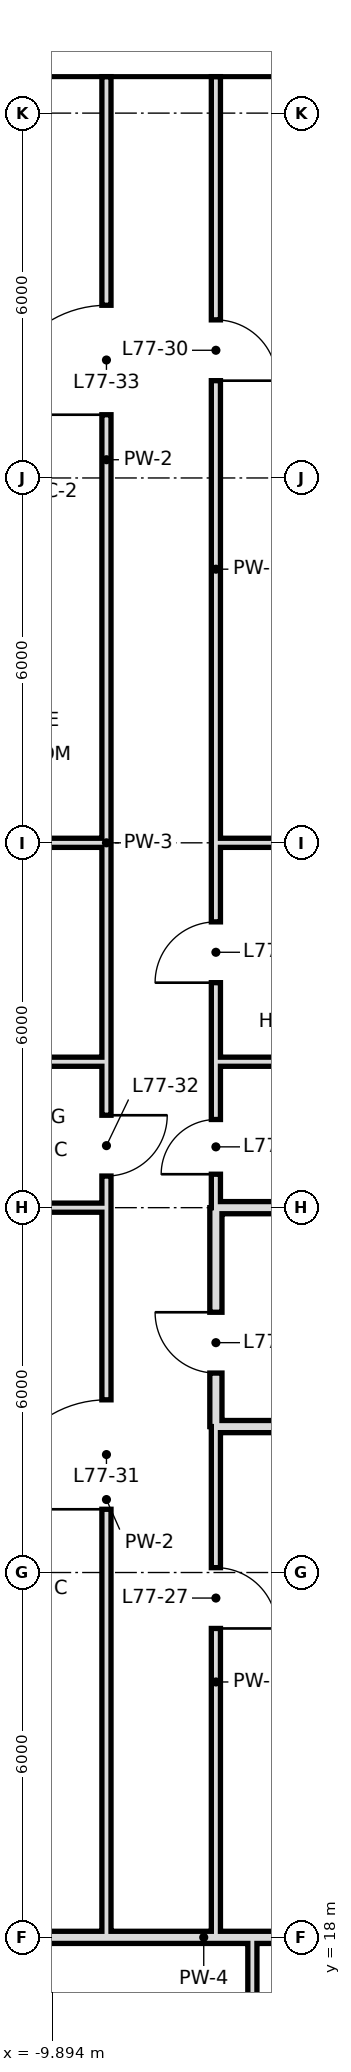
"""IFC4 building model, lengths in metres.
Left out: names, types, materials, properties, quantities, classifications, styles, units other than length and angle.
Written with IfcOpenShell. Run it as: python <this file> out.ifc"""

import sys

from ifc_helpers import new_model, si_unit, direction, frame, frame_2d, origin, place, context, subcontext, project, spatial, rectangle, extrude, element, fill, save


model = new_model("IFC4")
c1 = context("Model", 3, precision=1e-05, world=origin(), true_north=direction((0.0, 1.0)))
c2 = subcontext(c1, "Body", "Model", "MODEL_VIEW")
j1 = project(units=[si_unit("LENGTHUNIT", "METRE"), si_unit("PLANEANGLEUNIT", "RADIAN")], contexts=[c1])
p1 = place(None, origin())
s1 = spatial("IfcSite", under=j1, at=p1, CompositionType="ELEMENT")
p2 = place(p1, origin())
s2 = spatial("IfcBuilding", under=s1, at=p2, CompositionType="ELEMENT")
p3 = place(p2, frame((0.0, 0.0, 323.2)))
s3 = spatial("IfcBuildingStorey", under=s2, at=p3, CompositionType="ELEMENT", Elevation=323.2)
p4 = place(p3, frame((-6.6, 10.8, 0.0), z_axis=(0.0, 0.0, 1.0), x_axis=(0.0, 1.0, 0.0)))
e1 = element("IfcWall", 1, at=p4, inside=s3, PredefinedType="PARTITIONING", context=c2, shape_type="SweptSolid", body=[
    extrude(rectangle(XDim=7.2, YDim=0.15, at=frame_2d((3.6, 0.0))), origin(), (0.0, 0.0, 1.0), 3.42),
])
p5 = place(p3, frame((-7.2, 26.4, 0.0), z_axis=(0.0, 0.0, 1.0), x_axis=(0.0, 1.0, 0.0)))
e2 = element("IfcWall", 2, at=p5, inside=s3, PredefinedType="SOLIDWALL", context=c2, shape_type="SweptSolid", body=[
    extrude(rectangle(XDim=3.6, YDim=0.2, at=frame_2d((1.8, 0.0))), origin(), (0.0, 0.0, 1.0), 2.72),
])
p6 = place(p5, frame((0.88, 0.0, 0.0)))
e3 = element("IfcOpeningElement", 3, at=p6, cuts=e2, PredefinedType="OPENING", context=c2, shape_type="SweptSolid", body=[
    extrude(rectangle(XDim=1.0, YDim=2.4, at=frame_2d((0.5, 1.2))), frame((0.0, 0.11, 0.0), z_axis=(0.0, -1.0, 0.0), x_axis=(1.0, 0.0, 0.0)), (0.0, 0.0, 1.0), 0.22),
])
p7 = place(p3, frame((-7.2, 18.0, 0.0), z_axis=(0.0, 0.0, 1.0), x_axis=(0.0, 1.0, 0.0)))
e4 = element("IfcWall", 4, at=p7, inside=s3, PredefinedType="PARTITIONING", context=c2, shape_type="SweptSolid", body=[
    extrude(rectangle(XDim=8.4, YDim=0.15, at=frame_2d((4.2, 0.0))), origin(), (0.0, 0.0, 1.0), 3.42),
])
p8 = place(p7, frame((5.08, 0.0, 0.0)))
e5 = element("IfcOpeningElement", 5, at=p8, cuts=e4, PredefinedType="OPENING", context=c2, shape_type="SweptSolid", body=[
    extrude(rectangle(XDim=1.0, YDim=2.4, at=frame_2d((0.5, 1.2))), frame((0.0, 0.085, 0.0), z_axis=(0.0, -1.0, 0.0), x_axis=(1.0, 0.0, 0.0)), (0.0, 0.0, 1.0), 0.17),
])
p9 = place(p3, frame((-7.2, 32.4, 0.0), z_axis=(0.0, 0.0, 1.0), x_axis=(0.0, 1.0, 0.0)))
e6 = element("IfcWall", 6, at=p9, inside=s3, PredefinedType="PARTITIONING", context=c2, shape_type="SweptSolid", body=[
    extrude(rectangle(XDim=16.2, YDim=0.15, at=frame_2d((8.1, 0.0))), origin(), (0.0, 0.0, 1.0), 3.42),
])
p10 = place(p9, frame((1.3, 0.0, 0.0)))
e7 = element("IfcOpeningElement", 7, at=p10, cuts=e6, PredefinedType="OPENING", context=c2, shape_type="SweptSolid", body=[
    extrude(rectangle(XDim=1.0, YDim=2.4, at=frame_2d((0.5, 1.2))), frame((0.0, 0.085, 0.0), z_axis=(0.0, -1.0, 0.0), x_axis=(1.0, 0.0, 0.0)), (0.0, 0.0, 1.0), 0.17),
])
p11 = place(p9, frame((11.2, 0.0, 0.0)))
e8 = element("IfcOpeningElement", 8, at=p11, cuts=e6, PredefinedType="OPENING", context=c2, shape_type="SweptSolid", body=[
    extrude(rectangle(XDim=1.0, YDim=2.4, at=frame_2d((0.5, 1.2))), frame((0.0, 0.085, 0.0), z_axis=(0.0, -1.0, 0.0), x_axis=(1.0, 0.0, 0.0)), (0.0, 0.0, 1.0), 0.17),
])
p12 = place(p3, frame((-7.2, 30.0, 0.0), z_axis=(0.0, 0.0, 1.0), x_axis=(0.0, 1.0, 0.0)))
e9 = element("IfcWall", 9, at=p12, inside=s3, PredefinedType="PARTITIONING", context=c2, shape_type="SweptSolid", body=[
    extrude(rectangle(XDim=2.4, YDim=0.15, at=frame_2d((1.2, 0.0))), origin(), (0.0, 0.0, 1.0), 3.42),
])
p13 = place(p12, frame((0.55, 0.0, 0.0)))
e10 = element("IfcOpeningElement", 10, at=p13, cuts=e9, PredefinedType="OPENING", context=c2, shape_type="SweptSolid", body=[
    extrude(rectangle(XDim=0.9, YDim=2.4, at=frame_2d((0.45, 1.2))), frame((0.0, 0.085, 0.0), z_axis=(0.0, -1.0, 0.0), x_axis=(1.0, 0.0, 0.0)), (0.0, 0.0, 1.0), 0.17),
])
p14 = place(p3, frame((-9.0, 18.0, 0.0), z_axis=(0.0, 0.0, 1.0), x_axis=(0.0, 1.0, 0.0)))
e11 = element("IfcWall", 11, at=p14, inside=s3, PredefinedType="PARTITIONING", context=c2, shape_type="SweptSolid", body=[
    extrude(rectangle(XDim=14.4, YDim=0.15, at=frame_2d((7.2, 0.0))), origin(), (0.0, 0.0, 1.0), 3.42),
])
p15 = place(p14, frame((7.04, 0.0, 0.0)))
e12 = element("IfcOpeningElement", 12, at=p15, cuts=e11, PredefinedType="OPENING", context=c2, shape_type="SweptSolid", body=[
    extrude(rectangle(XDim=1.8, YDim=2.4, at=frame_2d((0.9, 1.2))), frame((0.0, 0.085, 0.0), z_axis=(0.0, -1.0, 0.0), x_axis=(1.0, 0.0, 0.0)), (0.0, 0.0, 1.0), 0.17),
])
p16 = place(p14, frame((12.52, 0.0, 0.0)))
e13 = element("IfcOpeningElement", 13, at=p16, cuts=e11, PredefinedType="OPENING", context=c2, shape_type="SweptSolid", body=[
    extrude(rectangle(XDim=1.0, YDim=2.4, at=frame_2d((0.5, 1.2))), frame((0.0, 0.085, 0.0), z_axis=(0.0, -1.0, 0.0), x_axis=(1.0, 0.0, 0.0)), (0.0, 0.0, 1.0), 0.17),
])
p17 = place(p3, frame((-9.0, 36.0, 0.0), z_axis=(0.0, 0.0, 1.0), x_axis=(0.0, 1.0, 0.0)))
e14 = element("IfcWall", 14, at=p17, inside=s3, PredefinedType="PARTITIONING", context=c2, shape_type="SweptSolid", body=[
    extrude(rectangle(XDim=12.6, YDim=0.15, at=frame_2d((6.3, 0.0))), origin(), (0.0, 0.0, 1.0), 3.42),
])
p18 = place(p17, frame((7.04, 0.0, 0.0)))
e15 = element("IfcOpeningElement", 15, at=p18, cuts=e14, PredefinedType="OPENING", context=c2, shape_type="SweptSolid", body=[
    extrude(rectangle(XDim=1.8, YDim=2.4, at=frame_2d((0.9, 1.2))), frame((0.0, 0.085, 0.0), z_axis=(0.0, -1.0, 0.0), x_axis=(1.0, 0.0, 0.0)), (0.0, 0.0, 1.0), 0.17),
])
p19 = place(p3, frame((-9.0, 32.4, 0.0), z_axis=(0.0, 0.0, 1.0), x_axis=(0.0, 1.0, 0.0)))
e16 = element("IfcWall", 16, at=p19, inside=s3, PredefinedType="PARTITIONING", context=c2, shape_type="SweptSolid", body=[
    extrude(rectangle(XDim=3.6, YDim=0.15, at=frame_2d((1.8, 0.0))), origin(), (0.0, 0.0, 1.0), 3.42),
])
p20 = place(p3, frame((-18.6, 18.0, 0.0), z_axis=(0.0, 0.0, 1.0), x_axis=(1.0, 0.0, 0.0)))
e17 = element("IfcWall", 17, at=p20, inside=s3, PredefinedType="SOLIDWALL", context=c2, shape_type="SweptSolid", body=[
    extrude(rectangle(XDim=21.7, YDim=0.2, at=frame_2d((10.85, 0.0))), origin(), (0.0, 0.0, 1.0), 2.72),
])
for number, where, z_axis, x_axis in (
    (18, (-7.2, 26.4, 0.0), (0.0, 0.0, 1.0), (1.0, 0.0, 0.0)),
    (19, (-7.2, 30.0, 0.0), (0.0, 0.0, 1.0), (1.0, 0.0, 0.0)),
):
    element("IfcWall", number, at=place(p3, frame(where, z_axis=z_axis, x_axis=x_axis)), inside=s3, PredefinedType="SOLIDWALL", context=c2, shape_type="SweptSolid", body=[
        extrude(rectangle(XDim=10.3, YDim=0.2, at=frame_2d((5.15, 0.0))), origin(), (0.0, 0.0, 1.0), 2.72),
    ])
p21 = place(p3, frame((-18.6, 30.0, 0.0), z_axis=(0.0, 0.0, 1.0), x_axis=(1.0, 0.0, 0.0)))
e20 = element("IfcWall", 20, at=p21, inside=s3, PredefinedType="PARTITIONING", context=c2, shape_type="SweptSolid", body=[
    extrude(rectangle(XDim=9.6, YDim=0.15, at=frame_2d((4.8, 0.0))), origin(), (0.0, 0.0, 1.0), 2.72),
])
p22 = place(p3, frame((-12.0, 32.4, 0.0), z_axis=(0.0, 0.0, 1.0), x_axis=(1.0, 0.0, 0.0)))
e21 = element("IfcWall", 21, at=p22, inside=s3, PredefinedType="PARTITIONING", context=c2, shape_type="SweptSolid", body=[
    extrude(rectangle(XDim=3.0, YDim=0.15, at=frame_2d((1.5, 0.0))), origin(), (0.0, 0.0, 1.0), 3.42),
])
p23 = place(p3, frame((-7.2, 32.4, 0.0), z_axis=(0.0, 0.0, 1.0), x_axis=(1.0, 0.0, 0.0)))
e22 = element("IfcWall", 22, at=p23, inside=s3, PredefinedType="PARTITIONING", context=c2, shape_type="SweptSolid", body=[
    extrude(rectangle(XDim=10.3, YDim=0.15, at=frame_2d((5.15, 0.0))), origin(), (0.0, 0.0, 1.0), 3.42),
])
p24 = place(p3, frame((-7.2, 36.0, 0.0), z_axis=(0.0, 0.0, 1.0), x_axis=(1.0, 0.0, 0.0)))
e23 = element("IfcWall", 23, at=p24, inside=s3, PredefinedType="PARTITIONING", context=c2, shape_type="SweptSolid", body=[
    extrude(rectangle(XDim=10.3, YDim=0.15, at=frame_2d((5.15, 0.0))), origin(), (0.0, 0.0, 1.0), 2.72),
])
p25 = place(p3, frame((-12.0, 36.0, 0.0), z_axis=(0.0, 0.0, 1.0), x_axis=(1.0, 0.0, 0.0)))
e24 = element("IfcWall", 24, at=p25, inside=s3, PredefinedType="PARTITIONING", context=c2, shape_type="SweptSolid", body=[
    extrude(rectangle(XDim=3.0, YDim=0.15, at=frame_2d((1.5, 0.0))), origin(), (0.0, 0.0, 1.0), 2.72),
])
p26 = place(p10, origin())
e25 = element("IfcDoor", 25, at=p26, inside=s3, OperationType="SINGLE_SWING_LEFT", PredefinedType="DOOR", context=c2, shape_type="SweptSolid", body=[
    extrude(rectangle(XDim=1.0, YDim=2.4, at=frame_2d((0.5, 1.2))), frame((0.0, 0.025, 0.0), z_axis=(0.0, -1.0, 0.0), x_axis=(1.0, 0.0, 0.0)), (0.0, 0.0, 1.0), 0.05),
])
fill(e7, e25)
p27 = place(p8, frame((1.0, 0.0, 0.0), z_axis=(0.0, 0.0, 1.0), x_axis=(-1.0, 0.0, 0.0)))
e26 = element("IfcDoor", 26, at=p27, inside=s3, OperationType="SINGLE_SWING_RIGHT", PredefinedType="DOOR", context=c2, shape_type="SweptSolid", body=[
    extrude(rectangle(XDim=1.0, YDim=2.4, at=frame_2d((0.5, 1.2))), frame((0.0, 0.025, 0.0), z_axis=(0.0, -1.0, 0.0), x_axis=(1.0, 0.0, 0.0)), (0.0, 0.0, 1.0), 0.05),
])
fill(e5, e26)
p28 = place(p6, frame((1.0, 0.0, 0.0), z_axis=(0.0, 0.0, 1.0), x_axis=(-1.0, 0.0, 0.0)))
e27 = element("IfcDoor", 27, at=p28, inside=s3, OperationType="SINGLE_SWING_LEFT", PredefinedType="DOOR", context=c2, shape_type="SweptSolid", body=[
    extrude(rectangle(XDim=1.0, YDim=2.4, at=frame_2d((0.5, 1.2))), frame((0.0, 0.025, 0.0), z_axis=(0.0, -1.0, 0.0), x_axis=(1.0, 0.0, 0.0)), (0.0, 0.0, 1.0), 0.05),
])
fill(e3, e27)
p29 = place(p13, origin())
e28 = element("IfcDoor", 28, at=p29, inside=s3, OperationType="SINGLE_SWING_LEFT", PredefinedType="DOOR", context=c2, shape_type="SweptSolid", body=[
    extrude(rectangle(XDim=0.9, YDim=2.4, at=frame_2d((0.45, 1.2))), frame((0.0, 0.025, 0.0), z_axis=(0.0, -1.0, 0.0), x_axis=(1.0, 0.0, 0.0)), (0.0, 0.0, 1.0), 0.05),
])
fill(e10, e28)
p30 = place(p11, frame((1.0, 0.0, 0.0), z_axis=(0.0, 0.0, 1.0), x_axis=(-1.0, 0.0, 0.0)))
e29 = element("IfcDoor", 29, at=p30, inside=s3, OperationType="SINGLE_SWING_RIGHT", PredefinedType="DOOR", context=c2, shape_type="SweptSolid", body=[
    extrude(rectangle(XDim=1.0, YDim=2.4, at=frame_2d((0.5, 1.2))), frame((0.0, 0.025, 0.0), z_axis=(0.0, -1.0, 0.0), x_axis=(1.0, 0.0, 0.0)), (0.0, 0.0, 1.0), 0.05),
])
fill(e8, e29)
p31 = place(p15, origin())
e30 = element("IfcDoor", 30, at=p31, inside=s3, OperationType="SINGLE_SWING_LEFT", PredefinedType="DOOR", context=c2, shape_type="SweptSolid", body=[
    extrude(rectangle(XDim=1.8, YDim=2.4, at=frame_2d((0.9, 1.2))), frame((0.0, 0.025, 0.0), z_axis=(0.0, -1.0, 0.0), x_axis=(1.0, 0.0, 0.0)), (0.0, 0.0, 1.0), 0.05),
])
fill(e12, e30)
p32 = place(p16, origin())
e31 = element("IfcDoor", 31, at=p32, inside=s3, OperationType="SINGLE_SWING_RIGHT", PredefinedType="DOOR", context=c2, shape_type="SweptSolid", body=[
    extrude(rectangle(XDim=1.0, YDim=2.4, at=frame_2d((0.5, 1.2))), frame((0.0, 0.025, 0.0), z_axis=(0.0, -1.0, 0.0), x_axis=(1.0, 0.0, 0.0)), (0.0, 0.0, 1.0), 0.05),
])
fill(e13, e31)
p33 = place(p18, origin())
e32 = element("IfcDoor", 32, at=p33, inside=s3, OperationType="SINGLE_SWING_LEFT", PredefinedType="DOOR", context=c2, shape_type="SweptSolid", body=[
    extrude(rectangle(XDim=1.8, YDim=2.4, at=frame_2d((0.9, 1.2))), frame((0.0, 0.025, 0.0), z_axis=(0.0, -1.0, 0.0), x_axis=(1.0, 0.0, 0.0)), (0.0, 0.0, 1.0), 0.05),
])
fill(e15, e32)
save(model, sys.argv[1])
